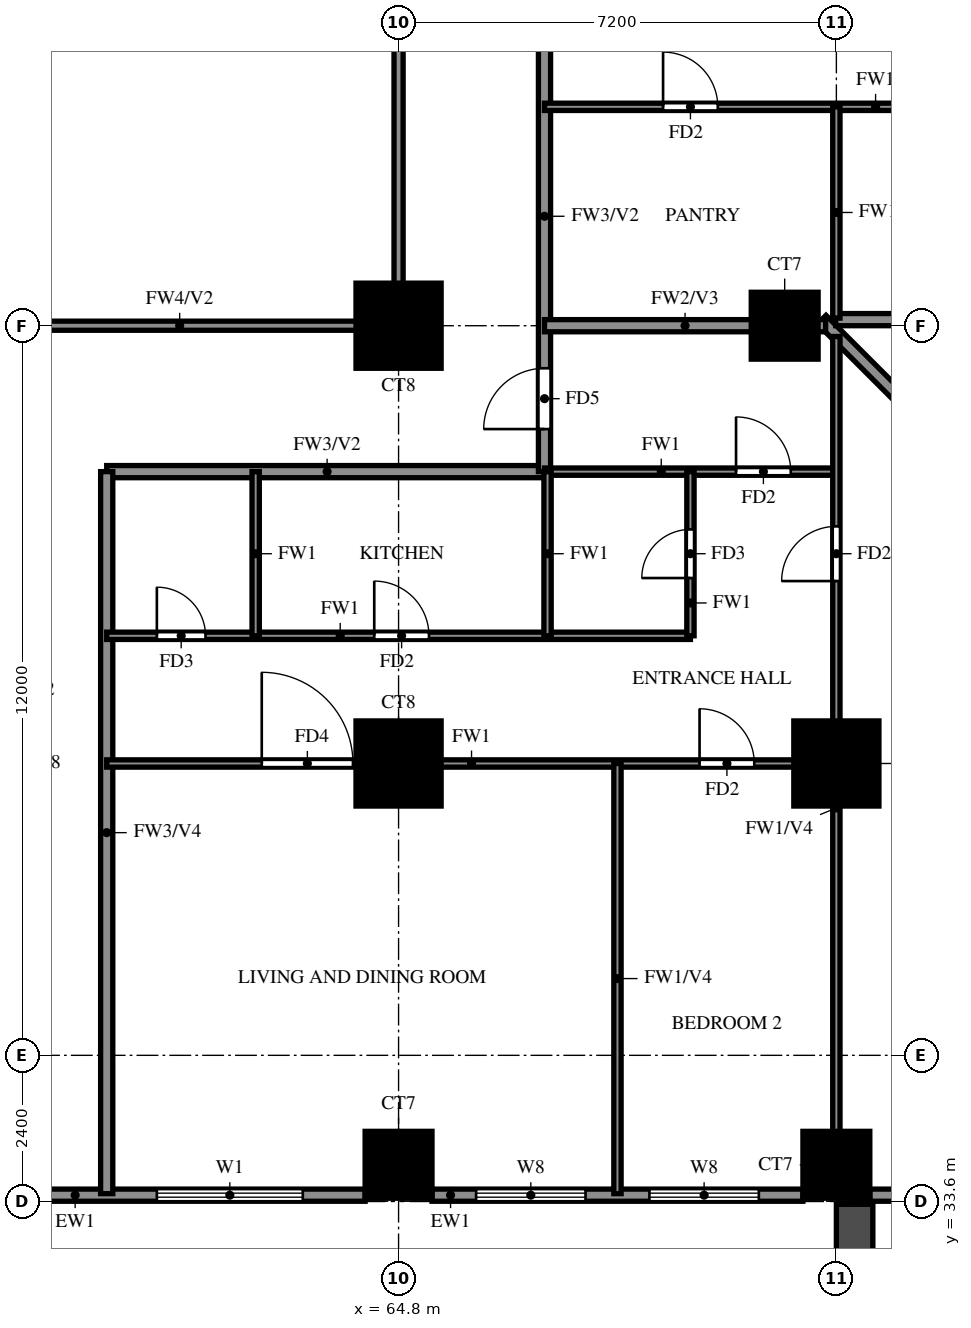
"""IFC4 building model, lengths in metres.
Left out: names, types, materials, properties, quantities, classifications, styles, units other than length and angle.
Written with IfcOpenShell. Run it as: python <this file> out.ifc"""

import sys

from ifc_helpers import new_model, si_unit, direction, frame, frame_2d, origin, origin_2d, place, context, subcontext, project, spatial, rectangle, extrude, source, transform, mapped, element, fill, save


model = new_model("IFC4")
c1 = context("Model", 3, precision=1e-05, world=origin(), true_north=direction((0.0, 1.0)))
c2 = subcontext(c1, "Body", "Model", "MODEL_VIEW")
j1 = project(units=[si_unit("LENGTHUNIT", "METRE"), si_unit("PLANEANGLEUNIT", "RADIAN")], contexts=[c1])
p1 = place(None, origin())
s1 = spatial("IfcSite", under=j1, at=p1, CompositionType="ELEMENT")
p2 = place(p1, origin())
s2 = spatial("IfcBuilding", under=s1, at=p2, CompositionType="ELEMENT")
p3 = place(p2, frame((0.0, 0.0, 34.0)))
s3 = spatial("IfcBuildingStorey", under=s2, at=p3, CompositionType="ELEMENT", Elevation=34.0)
m1 = source(origin(), c2, "Body", "SweptSolid", [
    extrude(rectangle(XDim=1.1, YDim=1.1, at=origin_2d()), origin(), (0.0, 0.0, 1.0), 3.18),
])
for number, where, z_axis, x_axis in (
    (1, (64.8, 34.2, 0.0), (0.0, 0.0, 1.0), (1.0, 0.0, 0.0)),
    (2, (72.0, 34.2, 0.0), (0.0, 0.0, 1.0), (1.0, 0.0, 0.0)),
):
    element("IfcColumn", number, at=place(p3, frame(where, z_axis=z_axis, x_axis=x_axis)), inside=s3, PredefinedType="COLUMN", context=c2, shape_type="MappedRepresentation", body=[
        mapped(m1, transform((0.0, 0.0, 0.0))),
    ])
m2 = source(origin(), c2, "Body", "SweptSolid", [
    extrude(rectangle(XDim=1.4, YDim=1.4, at=origin_2d()), origin(), (0.0, 0.0, 1.0), 3.18),
])
for number, where, z_axis, x_axis in (
    (3, (64.8, 40.8, 0.0), (0.0, 0.0, 1.0), (1.0, 0.0, 0.0)),
    (4, (72.0, 40.8, 0.0), (0.0, 0.0, 1.0), (1.0, 0.0, 0.0)),
    (5, (64.8, 48.0, 0.0), (0.0, 0.0, 1.0), (1.0, 0.0, 0.0)),
):
    element("IfcColumn", number, at=place(p3, frame(where, z_axis=z_axis, x_axis=x_axis)), inside=s3, PredefinedType="COLUMN", context=c2, shape_type="MappedRepresentation", body=[
        mapped(m2, transform((0.0, 0.0, 0.0))),
    ])
p4 = place(p3, frame((71.15, 48.0, 0.0), z_axis=(0.0, 0.0, 1.0), x_axis=(1.0, 0.0, 0.0)))
e6 = element("IfcColumn", 6, at=p4, inside=s3, PredefinedType="COLUMN", context=c2, shape_type="MappedRepresentation", body=[
    mapped(m1, transform((0.0, 0.0, 0.0))),
])
p5 = place(p3, frame((78.74, 41.118, 0.0), z_axis=(0.0, 0.0, 1.0), x_axis=(-0.707106781187, 0.707106781187, 0.0)))
e7 = element("IfcWall", 7, at=p5, inside=s3, PredefinedType="SOLIDWALL", context=c2, shape_type="SweptSolid", body=[
    extrude(rectangle(XDim=9.874, YDim=0.2, at=frame_2d((4.937, 0.0))), origin(), (0.0, 0.0, 1.0), 3.18),
])
p6 = place(p3, frame((71.989, 48.1, 0.0), z_axis=(0.0, 0.0, 1.0), x_axis=(1.0, 0.0, 0.0)))
e8 = element("IfcWall", 8, at=p6, inside=s3, PredefinedType="SOLIDWALL", context=c2, shape_type="SweptSolid", body=[
    extrude(rectangle(XDim=6.511, YDim=0.2, at=frame_2d((3.256, 0.0))), origin(), (0.0, 0.0, 1.0), 3.18),
])
p7 = place(p6, frame((2.206, 0.0, 1.5)))
e9 = element("IfcOpeningElement", 9, at=p7, cuts=e8, PredefinedType="OPENING", context=c2, shape_type="SweptSolid", body=[
    extrude(rectangle(XDim=0.9, YDim=0.9, at=frame_2d((0.45, 0.45))), frame((0.0, 0.11, 0.0), z_axis=(0.0, -1.0, 0.0), x_axis=(1.0, 0.0, 0.0)), (0.0, 0.0, 1.0), 0.22),
])
p8 = place(p3, frame((58.8, 33.7, 0.0), z_axis=(0.0, 0.0, 1.0), x_axis=(1.0, 0.0, 0.0)))
e10 = element("IfcWall", 10, at=p8, inside=s3, PredefinedType="SOLIDWALL", context=c2, shape_type="SweptSolid", body=[
    extrude(rectangle(XDim=5.45, YDim=0.2, at=frame_2d((2.725, 0.0))), origin(), (0.0, 0.0, 1.0), 3.18),
])
p9 = place(p8, frame((2.025, 0.0, 0.6)))
e11 = element("IfcOpeningElement", 11, at=p9, cuts=e10, PredefinedType="OPENING", context=c2, shape_type="SweptSolid", body=[
    extrude(rectangle(XDim=2.4, YDim=2.4, at=frame_2d((1.2, 1.2))), frame((0.0, 0.11, 0.0), z_axis=(0.0, -1.0, 0.0), x_axis=(1.0, 0.0, 0.0)), (0.0, 0.0, 1.0), 0.22),
])
p10 = place(p3, frame((65.35, 33.7, 0.0), z_axis=(0.0, 0.0, 1.0), x_axis=(1.0, 0.0, 0.0)))
e12 = element("IfcWall", 12, at=p10, inside=s3, PredefinedType="SOLIDWALL", context=c2, shape_type="SweptSolid", body=[
    extrude(rectangle(XDim=6.1, YDim=0.2, at=frame_2d((3.05, 0.0))), origin(), (0.0, 0.0, 1.0), 3.18),
])
p11 = place(p10, frame((3.575, 0.0, 0.6)))
e13 = element("IfcOpeningElement", 13, at=p11, cuts=e12, PredefinedType="OPENING", context=c2, shape_type="SweptSolid", body=[
    extrude(rectangle(XDim=1.8, YDim=2.4, at=frame_2d((0.9, 1.2))), frame((0.0, 0.11, 0.0), z_axis=(0.0, -1.0, 0.0), x_axis=(1.0, 0.0, 0.0)), (0.0, 0.0, 1.0), 0.22),
])
p12 = place(p10, frame((0.725, 0.0, 0.6)))
e14 = element("IfcOpeningElement", 14, at=p12, cuts=e12, PredefinedType="OPENING", context=c2, shape_type="SweptSolid", body=[
    extrude(rectangle(XDim=1.8, YDim=2.4, at=frame_2d((0.9, 1.2))), frame((0.0, 0.11, 0.0), z_axis=(0.0, -1.0, 0.0), x_axis=(1.0, 0.0, 0.0)), (0.0, 0.0, 1.0), 0.22),
])
p13 = place(p3, frame((72.55, 33.7, 0.0), z_axis=(0.0, 0.0, 1.0), x_axis=(1.0, 0.0, 0.0)))
e15 = element("IfcWall", 15, at=p13, inside=s3, PredefinedType="SOLIDWALL", context=c2, shape_type="SweptSolid", body=[
    extrude(rectangle(XDim=13.609, YDim=0.2, at=frame_2d((6.804, 0.0))), origin(), (0.0, 0.0, 1.0), 3.18),
])
p14 = place(p13, frame((2.15, 0.0, 0.0)))
e16 = element("IfcOpeningElement", 16, at=p14, cuts=e15, PredefinedType="OPENING", context=c2, shape_type="SweptSolid", body=[
    extrude(rectangle(XDim=1.8, YDim=2.4, at=frame_2d((0.9, 1.2))), frame((0.0, 0.11, 0.0), z_axis=(0.0, -1.0, 0.0), x_axis=(1.0, 0.0, 0.0)), (0.0, 0.0, 1.0), 0.22),
])
p15 = place(p13, frame((0.425, 0.0, 0.6)))
e17 = element("IfcOpeningElement", 17, at=p15, cuts=e15, PredefinedType="OPENING", context=c2, shape_type="SweptSolid", body=[
    extrude(rectangle(XDim=1.2, YDim=2.4, at=frame_2d((0.6, 1.2))), frame((0.0, 0.11, 0.0), z_axis=(0.0, -1.0, 0.0), x_axis=(1.0, 0.0, 0.0)), (0.0, 0.0, 1.0), 0.22),
])
p16 = place(p13, frame((4.55, 0.0, 0.6)))
e18 = element("IfcOpeningElement", 18, at=p16, cuts=e15, PredefinedType="OPENING", context=c2, shape_type="SweptSolid", body=[
    extrude(rectangle(XDim=1.2, YDim=2.4, at=frame_2d((0.6, 1.2))), frame((0.0, 0.11, 0.0), z_axis=(0.0, -1.0, 0.0), x_axis=(1.0, 0.0, 0.0)), (0.0, 0.0, 1.0), 0.22),
])
p17 = place(p13, frame((6.8, 0.0, 0.6)))
e19 = element("IfcOpeningElement", 19, at=p17, cuts=e15, PredefinedType="OPENING", context=c2, shape_type="SweptSolid", body=[
    extrude(rectangle(XDim=0.9, YDim=2.4, at=frame_2d((0.45, 1.2))), frame((0.0, 0.11, 0.0), z_axis=(0.0, -1.0, 0.0), x_axis=(1.0, 0.0, 0.0)), (0.0, 0.0, 1.0), 0.22),
])
p18 = place(p13, frame((9.429, 0.0, 0.6)))
e20 = element("IfcOpeningElement", 20, at=p18, cuts=e15, PredefinedType="OPENING", context=c2, shape_type="SweptSolid", body=[
    extrude(rectangle(XDim=2.4, YDim=2.4, at=frame_2d((1.2, 1.2))), frame((0.0, 0.11, 0.0), z_axis=(0.0, -1.0, 0.0), x_axis=(1.0, 0.0, 0.0)), (0.0, 0.0, 1.0), 0.22),
])
p19 = place(p3, frame((72.3, 33.55, 0.0), z_axis=(0.0, 0.0, 1.0), x_axis=(0.0, -1.0, 0.0)))
e21 = element("IfcWall", 21, at=p19, inside=s3, PredefinedType="SOLIDWALL", context=c2, shape_type="SweptSolid", body=[
    extrude(rectangle(XDim=2.65, YDim=0.6, at=frame_2d((1.325, 0.0))), origin(), (0.0, 0.0, 1.0), 2.85),
])
p20 = place(p3, frame((60.0, 45.6, 0.0), z_axis=(0.0, 0.0, 1.0), x_axis=(1.0, 0.0, 0.0)))
e22 = element("IfcWall", 22, at=p20, inside=s3, PredefinedType="SOLIDWALL", context=c2, shape_type="SweptSolid", body=[
    extrude(rectangle(XDim=7.25, YDim=0.2, at=frame_2d((3.625, 0.0))), origin(), (0.0, 0.0, 1.0), 3.18),
])
p21 = place(p3, frame((60.0, 33.725, 0.0), z_axis=(0.0, 0.0, 1.0), x_axis=(0.0, 1.0, 0.0)))
e23 = element("IfcWall", 23, at=p21, inside=s3, PredefinedType="SOLIDWALL", context=c2, shape_type="SweptSolid", body=[
    extrude(rectangle(XDim=11.875, YDim=0.2, at=frame_2d((5.938, 0.0))), origin(), (0.0, 0.0, 1.0), 2.28),
])
p22 = place(p3, frame((67.2, 45.6, 0.0), z_axis=(0.0, 0.0, 1.0), x_axis=(0.0, 1.0, 0.0)))
e24 = element("IfcWall", 24, at=p22, inside=s3, PredefinedType="SOLIDWALL", context=c2, shape_type="SweptSolid", body=[
    extrude(rectangle(XDim=8.4, YDim=0.2, at=frame_2d((4.2, 0.0))), origin(), (0.0, 0.0, 1.0), 3.18),
])
p23 = place(p22, frame((0.7, 0.0, 0.0)))
e25 = element("IfcOpeningElement", 25, at=p23, cuts=e24, PredefinedType="OPENING", context=c2, shape_type="SweptSolid", body=[
    extrude(rectangle(XDim=1.0, YDim=2.1, at=frame_2d((0.5, 1.05))), frame((0.0, 0.11, 0.0), z_axis=(0.0, -1.0, 0.0), x_axis=(1.0, 0.0, 0.0)), (0.0, 0.0, 1.0), 0.22),
])
p24 = place(p3, frame((67.2, 48.0, 0.0), z_axis=(0.0, 0.0, 1.0), x_axis=(1.0, 0.0, 0.0)))
e26 = element("IfcWall", 26, at=p24, inside=s3, PredefinedType="SOLIDWALL", context=c2, shape_type="SweptSolid", body=[
    extrude(rectangle(XDim=4.623, YDim=0.2, at=frame_2d((2.312, 0.0))), origin(), (0.0, 0.0, 1.0), 3.18),
])
p25 = place(p3, frame((60.0, 40.8, 0.0), z_axis=(0.0, 0.0, 1.0), x_axis=(1.0, 0.0, 0.0)))
e27 = element("IfcWall", 27, at=p25, inside=s3, PredefinedType="PARTITIONING", context=c2, shape_type="SweptSolid", body=[
    extrude(rectangle(XDim=12.0, YDim=0.12, at=frame_2d((6.0, 0.0))), origin(), (0.0, 0.0, 1.0), 3.18),
])
p26 = place(p25, frame((9.75, 0.0, 0.0)))
e28 = element("IfcOpeningElement", 28, at=p26, cuts=e27, PredefinedType="OPENING", context=c2, shape_type="SweptSolid", body=[
    extrude(rectangle(XDim=0.9, YDim=2.1, at=frame_2d((0.45, 1.05))), frame((0.0, 0.07, 0.0), z_axis=(0.0, -1.0, 0.0), x_axis=(1.0, 0.0, 0.0)), (0.0, 0.0, 1.0), 0.14),
])
p27 = place(p25, frame((2.55, 0.0, 0.0)))
e29 = element("IfcOpeningElement", 29, at=p27, cuts=e27, PredefinedType="OPENING", context=c2, shape_type="SweptSolid", body=[
    extrude(rectangle(XDim=1.5, YDim=2.1, at=frame_2d((0.75, 1.05))), frame((0.0, 0.07, 0.0), z_axis=(0.0, -1.0, 0.0), x_axis=(1.0, 0.0, 0.0)), (0.0, 0.0, 1.0), 0.14),
])
p28 = place(p3, frame((60.0, 42.9, 0.0), z_axis=(0.0, 0.0, 1.0), x_axis=(1.0, 0.0, 0.0)))
e30 = element("IfcWall", 30, at=p28, inside=s3, PredefinedType="PARTITIONING", context=c2, shape_type="SweptSolid", body=[
    extrude(rectangle(XDim=9.6, YDim=0.12, at=frame_2d((4.8, 0.0))), origin(), (0.0, 0.0, 1.0), 3.18),
])
p29 = place(p28, frame((4.4, 0.0, 0.0)))
e31 = element("IfcOpeningElement", 31, at=p29, cuts=e30, PredefinedType="OPENING", context=c2, shape_type="SweptSolid", body=[
    extrude(rectangle(XDim=0.9, YDim=2.1, at=frame_2d((0.45, 1.05))), frame((0.0, 0.07, 0.0), z_axis=(0.0, -1.0, 0.0), x_axis=(1.0, 0.0, 0.0)), (0.0, 0.0, 1.0), 0.14),
])
p30 = place(p28, frame((0.825, 0.0, 0.0)))
e32 = element("IfcOpeningElement", 32, at=p30, cuts=e30, PredefinedType="OPENING", context=c2, shape_type="SweptSolid", body=[
    extrude(rectangle(XDim=0.8, YDim=2.1, at=frame_2d((0.4, 1.05))), frame((0.0, 0.07, 0.0), z_axis=(0.0, -1.0, 0.0), x_axis=(1.0, 0.0, 0.0)), (0.0, 0.0, 1.0), 0.14),
])
p31 = place(p3, frame((67.2, 45.6, 0.0), z_axis=(0.0, 0.0, 1.0), x_axis=(1.0, 0.0, 0.0)))
e33 = element("IfcWall", 33, at=p31, inside=s3, PredefinedType="PARTITIONING", context=c2, shape_type="SweptSolid", body=[
    extrude(rectangle(XDim=4.8, YDim=0.12, at=frame_2d((2.4, 0.0))), origin(), (0.0, 0.0, 1.0), 3.18),
])
p32 = place(p31, frame((3.15, 0.0, 0.0)))
e34 = element("IfcOpeningElement", 34, at=p32, cuts=e33, PredefinedType="OPENING", context=c2, shape_type="SweptSolid", body=[
    extrude(rectangle(XDim=0.9, YDim=2.1, at=frame_2d((0.45, 1.05))), frame((0.0, 0.07, 0.0), z_axis=(0.0, -1.0, 0.0), x_axis=(1.0, 0.0, 0.0)), (0.0, 0.0, 1.0), 0.14),
])
p33 = place(p3, frame((67.2, 51.6, 0.0), z_axis=(0.0, 0.0, 1.0), x_axis=(1.0, 0.0, 0.0)))
e35 = element("IfcWall", 35, at=p33, inside=s3, PredefinedType="PARTITIONING", context=c2, shape_type="SweptSolid", body=[
    extrude(rectangle(XDim=9.9, YDim=0.12, at=frame_2d((4.95, 0.0))), origin(), (0.0, 0.0, 1.0), 3.18),
])
p34 = place(p33, frame((6.95, 0.0, 0.0)))
e36 = element("IfcOpeningElement", 36, at=p34, cuts=e35, PredefinedType="OPENING", context=c2, shape_type="SweptSolid", body=[
    extrude(rectangle(XDim=0.8, YDim=2.1, at=frame_2d((0.4, 1.05))), frame((0.0, 0.07, 0.0), z_axis=(0.0, -1.0, 0.0), x_axis=(1.0, 0.0, 0.0)), (0.0, 0.0, 1.0), 0.14),
])
p35 = place(p33, frame((1.95, 0.0, 0.0)))
e37 = element("IfcOpeningElement", 37, at=p35, cuts=e35, PredefinedType="OPENING", context=c2, shape_type="SweptSolid", body=[
    extrude(rectangle(XDim=0.9, YDim=2.1, at=frame_2d((0.45, 1.05))), frame((0.0, 0.07, 0.0), z_axis=(0.0, -1.0, 0.0), x_axis=(1.0, 0.0, 0.0)), (0.0, 0.0, 1.0), 0.14),
])
for number, where, z_axis, x_axis in (
    (38, (62.45, 42.9, 0.0), (0.0, 0.0, 1.0), (0.0, 1.0, 0.0)),
    (39, (67.25, 42.9, 0.0), (0.0, 0.0, 1.0), (0.0, 1.0, 0.0)),
):
    element("IfcWall", number, at=place(p3, frame(where, z_axis=z_axis, x_axis=x_axis)), inside=s3, PredefinedType="PARTITIONING", context=c2, shape_type="SweptSolid", body=[
        extrude(rectangle(XDim=2.7, YDim=0.12, at=frame_2d((1.35, 0.0))), origin(), (0.0, 0.0, 1.0), 3.18),
    ])
p36 = place(p3, frame((68.4, 33.725, 0.0), z_axis=(0.0, 0.0, 1.0), x_axis=(0.0, 1.0, 0.0)))
e40 = element("IfcWall", 40, at=p36, inside=s3, PredefinedType="PARTITIONING", context=c2, shape_type="SweptSolid", body=[
    extrude(rectangle(XDim=7.075, YDim=0.12, at=frame_2d((3.538, 0.0))), origin(), (0.0, 0.0, 1.0), 2.28),
])
p37 = place(p3, frame((69.6, 42.9, 0.0), z_axis=(0.0, 0.0, 1.0), x_axis=(0.0, 1.0, 0.0)))
e41 = element("IfcWall", 41, at=p37, inside=s3, PredefinedType="PARTITIONING", context=c2, shape_type="SweptSolid", body=[
    extrude(rectangle(XDim=2.7, YDim=0.12, at=frame_2d((1.35, 0.0))), origin(), (0.0, 0.0, 1.0), 3.18),
])
p38 = place(p37, frame((0.95, 0.0, 0.0)))
e42 = element("IfcOpeningElement", 42, at=p38, cuts=e41, PredefinedType="OPENING", context=c2, shape_type="SweptSolid", body=[
    extrude(rectangle(XDim=0.8, YDim=2.1, at=frame_2d((0.4, 1.05))), frame((0.0, 0.07, 0.0), z_axis=(0.0, -1.0, 0.0), x_axis=(1.0, 0.0, 0.0)), (0.0, 0.0, 1.0), 0.14),
])
p39 = place(p3, frame((72.0, 33.725, 0.0), z_axis=(0.0, 0.0, 1.0), x_axis=(0.0, 1.0, 0.0)))
e43 = element("IfcWall", 43, at=p39, inside=s3, PredefinedType="PARTITIONING", context=c2, shape_type="SweptSolid", body=[
    extrude(rectangle(XDim=14.098, YDim=0.12, at=frame_2d((7.049, 0.0))), origin(), (0.0, 0.0, 1.0), 2.28),
])
p40 = place(p39, frame((10.075, 0.0, 0.0)))
e44 = element("IfcOpeningElement", 44, at=p40, cuts=e43, PredefinedType="OPENING", context=c2, shape_type="SweptSolid", body=[
    extrude(rectangle(XDim=0.9, YDim=2.1, at=frame_2d((0.45, 1.05))), frame((0.0, 0.07, 0.0), z_axis=(0.0, -1.0, 0.0), x_axis=(1.0, 0.0, 0.0)), (0.0, 0.0, 1.0), 0.14),
])
p41 = place(p3, frame((72.0, 48.125, 0.0), z_axis=(0.0, 0.0, 1.0), x_axis=(0.0, 1.0, 0.0)))
e45 = element("IfcWall", 45, at=p41, inside=s3, PredefinedType="PARTITIONING", context=c2, shape_type="SweptSolid", body=[
    extrude(rectangle(XDim=3.475, YDim=0.12, at=frame_2d((1.738, 0.0))), origin(), (0.0, 0.0, 1.0), 3.18),
])
p42 = place(p3, frame((57.6, 48.0, 0.0), z_axis=(0.0, 0.0, 1.0), x_axis=(1.0, 0.0, 0.0)))
e46 = element("IfcWall", 46, at=p42, inside=s3, PredefinedType="SOLIDWALL", context=c2, shape_type="SweptSolid", body=[
    extrude(rectangle(XDim=7.2, YDim=0.15, at=frame_2d((3.6, 0.0))), origin(), (0.0, 0.0, 1.0), 2.28),
])
p43 = place(p3, frame((64.8, 48.0, 0.0), z_axis=(0.0, 0.0, 1.0), x_axis=(0.0, 1.0, 0.0)))
e47 = element("IfcWall", 47, at=p43, inside=s3, PredefinedType="SOLIDWALL", context=c2, shape_type="SweptSolid", body=[
    extrude(rectangle(XDim=14.4, YDim=0.15, at=frame_2d((7.2, 0.0))), origin(), (0.0, 0.0, 1.0), 2.28),
])
p44 = place(p9, origin())
e48 = element("IfcWindow", 48, at=p44, inside=s3, PartitioningType="DOUBLE_PANEL_VERTICAL", PredefinedType="WINDOW", context=c2, shape_type="SweptSolid", body=[
    extrude(rectangle(XDim=2.4, YDim=2.4, at=frame_2d((1.2, 1.2))), frame((0.0, 0.03, 0.0), z_axis=(0.0, -1.0, 0.0), x_axis=(1.0, 0.0, 0.0)), (0.0, 0.0, 1.0), 0.06),
])
fill(e11, e48)
p45 = place(p11, origin())
e49 = element("IfcWindow", 49, at=p45, inside=s3, PartitioningType="DOUBLE_PANEL_VERTICAL", PredefinedType="WINDOW", context=c2, shape_type="SweptSolid", body=[
    extrude(rectangle(XDim=1.8, YDim=2.4, at=frame_2d((0.9, 1.2))), frame((0.0, 0.03, 0.0), z_axis=(0.0, -1.0, 0.0), x_axis=(1.0, 0.0, 0.0)), (0.0, 0.0, 1.0), 0.06),
])
fill(e13, e49)
p46 = place(p12, origin())
e50 = element("IfcWindow", 50, at=p46, inside=s3, PartitioningType="DOUBLE_PANEL_VERTICAL", PredefinedType="WINDOW", context=c2, shape_type="SweptSolid", body=[
    extrude(rectangle(XDim=1.8, YDim=2.4, at=frame_2d((0.9, 1.2))), frame((0.0, 0.03, 0.0), z_axis=(0.0, -1.0, 0.0), x_axis=(1.0, 0.0, 0.0)), (0.0, 0.0, 1.0), 0.06),
])
fill(e14, e50)
p47 = place(p35, origin())
e51 = element("IfcDoor", 51, at=p47, inside=s3, OperationType="SINGLE_SWING_RIGHT", PredefinedType="DOOR", context=c2, shape_type="SweptSolid", body=[
    extrude(rectangle(XDim=0.9, YDim=2.1, at=frame_2d((0.45, 1.05))), frame((0.0, 0.025, 0.0), z_axis=(0.0, -1.0, 0.0), x_axis=(1.0, 0.0, 0.0)), (0.0, 0.0, 1.0), 0.05),
])
fill(e37, e51)
p48 = place(p32, origin())
e52 = element("IfcDoor", 52, at=p48, inside=s3, OperationType="SINGLE_SWING_LEFT", PredefinedType="DOOR", context=c2, shape_type="SweptSolid", body=[
    extrude(rectangle(XDim=0.9, YDim=2.1, at=frame_2d((0.45, 1.05))), frame((0.0, 0.025, 0.0), z_axis=(0.0, -1.0, 0.0), x_axis=(1.0, 0.0, 0.0)), (0.0, 0.0, 1.0), 0.05),
])
fill(e34, e52)
p49 = place(p23, origin())
e53 = element("IfcDoor", 53, at=p49, inside=s3, OperationType="SINGLE_SWING_RIGHT", PredefinedType="DOOR", context=c2, shape_type="SweptSolid", body=[
    extrude(rectangle(XDim=1.0, YDim=2.1, at=frame_2d((0.5, 1.05))), frame((0.0, 0.025, 0.0), z_axis=(0.0, -1.0, 0.0), x_axis=(1.0, 0.0, 0.0)), (0.0, 0.0, 1.0), 0.05),
])
fill(e25, e53)
p50 = place(p26, origin())
e54 = element("IfcDoor", 54, at=p50, inside=s3, OperationType="SINGLE_SWING_LEFT", PredefinedType="DOOR", context=c2, shape_type="SweptSolid", body=[
    extrude(rectangle(XDim=0.9, YDim=2.1, at=frame_2d((0.45, 1.05))), frame((0.0, 0.025, 0.0), z_axis=(0.0, -1.0, 0.0), x_axis=(1.0, 0.0, 0.0)), (0.0, 0.0, 1.0), 0.05),
])
fill(e28, e54)
p51 = place(p27, origin())
e55 = element("IfcDoor", 55, at=p51, inside=s3, OperationType="SINGLE_SWING_RIGHT", PredefinedType="DOOR", context=c2, shape_type="SweptSolid", body=[
    extrude(rectangle(XDim=1.5, YDim=2.1, at=frame_2d((0.75, 1.05))), frame((0.0, 0.025, 0.0), z_axis=(0.0, -1.0, 0.0), x_axis=(1.0, 0.0, 0.0)), (0.0, 0.0, 1.0), 0.05),
])
fill(e29, e55)
p52 = place(p38, origin())
e56 = element("IfcDoor", 56, at=p52, inside=s3, OperationType="SINGLE_SWING_RIGHT", PredefinedType="DOOR", context=c2, shape_type="SweptSolid", body=[
    extrude(rectangle(XDim=0.8, YDim=2.1, at=frame_2d((0.4, 1.05))), frame((0.0, 0.025, 0.0), z_axis=(0.0, -1.0, 0.0), x_axis=(1.0, 0.0, 0.0)), (0.0, 0.0, 1.0), 0.05),
])
fill(e42, e56)
p53 = place(p29, origin())
e57 = element("IfcDoor", 57, at=p53, inside=s3, OperationType="SINGLE_SWING_LEFT", PredefinedType="DOOR", context=c2, shape_type="SweptSolid", body=[
    extrude(rectangle(XDim=0.9, YDim=2.1, at=frame_2d((0.45, 1.05))), frame((0.0, 0.025, 0.0), z_axis=(0.0, -1.0, 0.0), x_axis=(1.0, 0.0, 0.0)), (0.0, 0.0, 1.0), 0.05),
])
fill(e31, e57)
p54 = place(p30, origin())
e58 = element("IfcDoor", 58, at=p54, inside=s3, OperationType="SINGLE_SWING_LEFT", PredefinedType="DOOR", context=c2, shape_type="SweptSolid", body=[
    extrude(rectangle(XDim=0.8, YDim=2.1, at=frame_2d((0.4, 1.05))), frame((0.0, 0.025, 0.0), z_axis=(0.0, -1.0, 0.0), x_axis=(1.0, 0.0, 0.0)), (0.0, 0.0, 1.0), 0.05),
])
fill(e32, e58)
p55 = place(p40, origin())
e59 = element("IfcDoor", 59, at=p55, inside=s3, OperationType="SINGLE_SWING_RIGHT", PredefinedType="DOOR", context=c2, shape_type="SweptSolid", body=[
    extrude(rectangle(XDim=0.9, YDim=2.1, at=frame_2d((0.45, 1.05))), frame((0.0, 0.025, 0.0), z_axis=(0.0, -1.0, 0.0), x_axis=(1.0, 0.0, 0.0)), (0.0, 0.0, 1.0), 0.05),
])
fill(e44, e59)
save(model, sys.argv[1])
